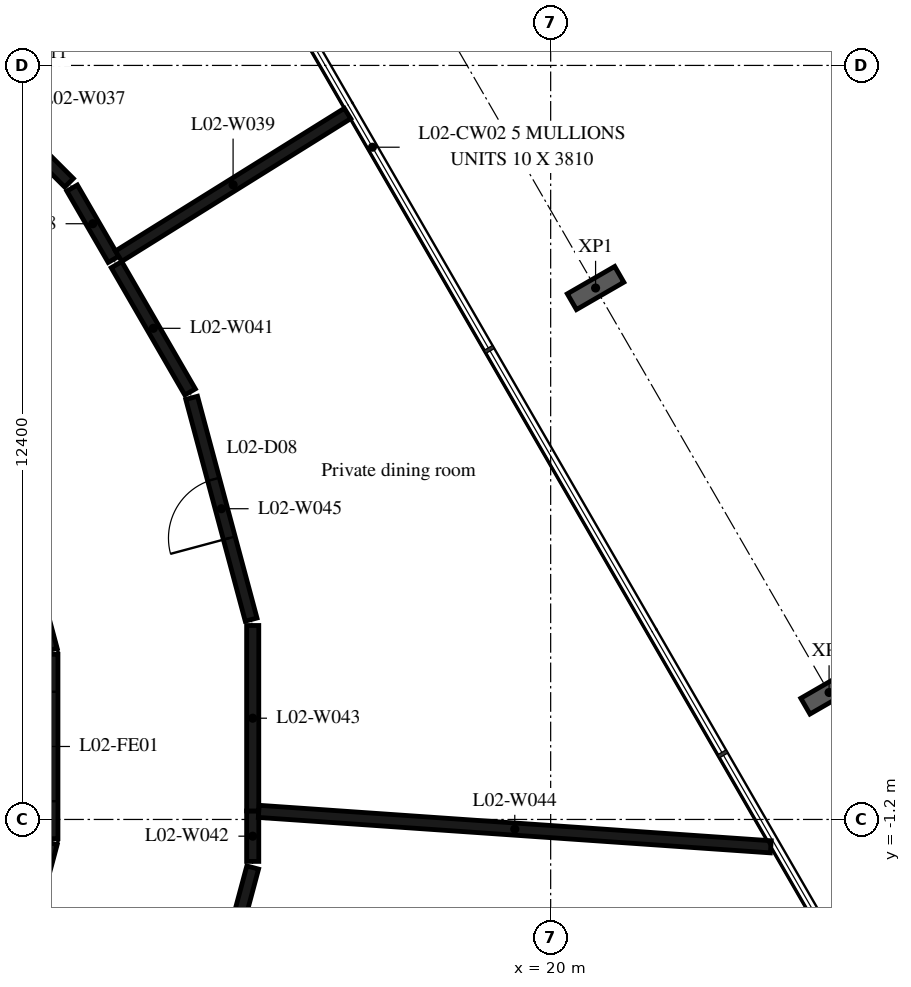
"""IFC4 building model, lengths in metres.
Left out: names, types, materials, properties, quantities, classifications, styles, units other than length and angle.
Written with IfcOpenShell. Run it as: python <this file> out.ifc"""

import sys

from ifc_helpers import new_model, si_unit, direction, frame, frame_2d, origin, origin_2d, place, context, subcontext, project, spatial, rectangle, i_section, extrude, element, fill, save


model = new_model("IFC4")
c1 = context("Model", 3, precision=1e-05, world=origin(), true_north=direction((0.0, 1.0)))
c2 = subcontext(c1, "Body", "Model", "MODEL_VIEW")
j1 = project(units=[si_unit("LENGTHUNIT", "METRE"), si_unit("PLANEANGLEUNIT", "RADIAN")], contexts=[c1])
p1 = place(None, origin())
s1 = spatial("IfcSite", under=j1, at=p1, CompositionType="ELEMENT")
p2 = place(p1, origin())
s2 = spatial("IfcBuilding", under=s1, at=p2, CompositionType="ELEMENT")
p3 = place(p2, frame((0.0, 0.0, 13.8)))
s3 = spatial("IfcBuildingStorey", under=s2, at=p3, CompositionType="ELEMENT", Elevation=13.8)
for number, where, z_axis, x_axis in (
    (1, (24.579, 0.888, -0.38), (0.0, 0.0, 1.0), (0.5, -0.866, 0.0)),
    (2, (20.739, 7.539, -0.38), (0.0, 0.0, 1.0), (0.5, -0.866, 0.0)),
):
    element("IfcColumn", number, at=place(p3, frame(where, z_axis=z_axis, x_axis=x_axis)), inside=s3, PredefinedType="COLUMN", context=c2, shape_type="SweptSolid", body=[
        extrude(i_section(OverallWidth=0.3, OverallDepth=0.9, WebThickness=0.019, FlangeThickness=0.035, FilletRadius=0.03, at=origin_2d()), origin(), (0.0, 0.0, 1.0), 4.8),
    ])
p4 = place(p3, frame((10.858, -4.479, 0.0), z_axis=(0.0, 0.0, 1.0), x_axis=(0.258734743916, 0.965948410781, 0.0)))
e3 = element("IfcWall", 3, at=p4, inside=s3, PredefinedType="SHEAR", context=c2, shape_type="SweptSolid", body=[
    extrude(rectangle(XDim=3.033, YDim=0.5, at=frame_2d((1.516, 0.0))), origin(), (0.0, 0.0, 1.0), 4.42),
])
p5 = place(p3, frame((11.647, -1.516, 0.0), z_axis=(0.0, 0.0, 1.0), x_axis=(0.0, 1.0, 0.0)))
e4 = element("IfcWall", 4, at=p5, inside=s3, PredefinedType="SHEAR", context=c2, shape_type="SweptSolid", body=[
    extrude(rectangle(XDim=3.033, YDim=0.5, at=frame_2d((1.516, 0.0))), origin(), (0.0, 0.0, 1.0), 4.42),
])
p6 = place(p5, frame((0.616, 0.0, 0.0)))
e5 = element("IfcOpeningElement", 5, at=p6, cuts=e4, PredefinedType="OPENING", context=c2, shape_type="SweptSolid", body=[
    extrude(rectangle(XDim=1.8, YDim=2.1, at=frame_2d((0.9, 1.05))), frame((0.0, 0.26, 0.0), z_axis=(0.0, -1.0, 0.0), x_axis=(1.0, 0.0, 0.0)), (0.0, 0.0, 1.0), 0.52),
])
p7 = place(p3, frame((11.643, 1.55, 0.0), z_axis=(0.0, 0.0, 1.0), x_axis=(-0.258734743916, 0.965948410781, 0.0)))
e6 = element("IfcWall", 6, at=p7, inside=s3, PredefinedType="SHEAR", context=c2, shape_type="SweptSolid", body=[
    extrude(rectangle(XDim=3.033, YDim=0.5, at=frame_2d((1.516, 0.0))), origin(), (0.0, 0.0, 1.0), 4.42),
])
p8 = place(p3, frame((12.08, 9.27, 0.0), z_axis=(0.0, 0.0, 1.0), x_axis=(-0.707106781187, 0.707106781187, 0.0)))
e7 = element("IfcWall", 7, at=p8, inside=s3, PredefinedType="PARTITIONING", context=c2, shape_type="SweptSolid", body=[
    extrude(rectangle(XDim=3.874, YDim=0.2, at=frame_2d((1.937, 0.0))), origin(), (0.0, 0.0, 1.0), 4.42),
])
p9 = place(p8, frame((1.437, 0.0, 0.0)))
e8 = element("IfcOpeningElement", 8, at=p9, cuts=e7, PredefinedType="OPENING", context=c2, shape_type="SweptSolid", body=[
    extrude(rectangle(XDim=1.0, YDim=2.1, at=frame_2d((0.5, 1.05))), frame((0.0, 0.11, 0.0), z_axis=(0.0, -1.0, 0.0), x_axis=(1.0, 0.0, 0.0)), (0.0, 0.0, 1.0), 0.22),
])
p10 = place(p3, frame((12.81, 8.01, 0.0), z_axis=(0.0, 0.0, 1.0), x_axis=(-0.501305875941, 0.865270142064, 0.0)))
e9 = element("IfcWall", 9, at=p10, inside=s3, PredefinedType="PARTITIONING", context=c2, shape_type="SweptSolid", body=[
    extrude(rectangle(XDim=1.356, YDim=0.2, at=frame_2d((0.678, 0.0))), origin(), (0.0, 0.0, 1.0), 4.42),
])
p11 = place(p3, frame((12.895, 8.063, 0.0), z_axis=(0.0, 0.0, 1.0), x_axis=(0.848634527268, 0.528979620712, 0.0)))
e10 = element("IfcWall", 10, at=p11, inside=s3, PredefinedType="PARTITIONING", context=c2, shape_type="SweptSolid", body=[
    extrude(rectangle(XDim=4.437, YDim=0.2, at=frame_2d((2.218, 0.0))), origin(), (0.0, 0.0, 1.0), 4.42),
])
p12 = place(p3, frame((14.096, -5.733, 0.0), z_axis=(0.0, 0.0, 1.0), x_axis=(0.259085569159, 0.96585437197, 0.0)))
e11 = element("IfcWall", 11, at=p12, inside=s3, PredefinedType="PARTITIONING", context=c2, shape_type="SweptSolid", body=[
    extrude(rectangle(XDim=3.876, YDim=0.2, at=frame_2d((1.938, 0.0))), origin(), (0.0, 0.0, 1.0), 4.42),
])
p13 = place(p12, frame((1.338, 0.0, 0.0)))
e12 = element("IfcOpeningElement", 12, at=p13, cuts=e11, PredefinedType="OPENING", context=c2, shape_type="SweptSolid", body=[
    extrude(rectangle(XDim=1.2, YDim=2.1, at=frame_2d((0.6, 1.05))), frame((0.0, 0.11, 0.0), z_axis=(0.0, -1.0, 0.0), x_axis=(1.0, 0.0, 0.0)), (0.0, 0.0, 1.0), 0.22),
])
p14 = place(p3, frame((14.07, 5.83, 0.0), z_axis=(0.0, 0.0, 1.0), x_axis=(-0.500439091614, 0.865771745661, 0.0)))
e13 = element("IfcWall", 13, at=p14, inside=s3, PredefinedType="PARTITIONING", context=c2, shape_type="SweptSolid", body=[
    extrude(rectangle(XDim=2.418, YDim=0.2, at=frame_2d((1.209, 0.0))), origin(), (0.0, 0.0, 1.0), 4.42),
])
p15 = place(p3, frame((15.1, -1.89, 0.0), z_axis=(0.0, 0.0, 1.0), x_axis=(0.0, 1.0, 0.0)))
e14 = element("IfcWall", 14, at=p15, inside=s3, PredefinedType="PARTITIONING", context=c2, shape_type="SweptSolid", body=[
    extrude(rectangle(XDim=0.83, YDim=0.2, at=frame_2d((0.415, 0.0))), origin(), (0.0, 0.0, 1.0), 4.42),
])
p16 = place(p3, frame((15.1, -1.06, 0.0), z_axis=(0.0, 0.0, 1.0), x_axis=(0.0, 1.0, 0.0)))
e15 = element("IfcWall", 15, at=p16, inside=s3, PredefinedType="PARTITIONING", context=c2, shape_type="SweptSolid", body=[
    extrude(rectangle(XDim=3.05, YDim=0.2, at=frame_2d((1.525, 0.0))), origin(), (0.0, 0.0, 1.0), 4.42),
])
p17 = place(p3, frame((15.2, -1.067, 0.0), z_axis=(0.0, 0.0, 1.0), x_axis=(0.997611670562, -0.069072098269, 0.0)))
e16 = element("IfcWall", 16, at=p17, inside=s3, PredefinedType="PARTITIONING", context=c2, shape_type="SweptSolid", body=[
    extrude(rectangle(XDim=8.441, YDim=0.2, at=frame_2d((4.22, 0.0))), origin(), (0.0, 0.0, 1.0), 4.42),
])
p18 = place(p3, frame((15.074, 2.087, 0.0), z_axis=(0.0, 0.0, 1.0), x_axis=(-0.259038819442, 0.965866911133, 0.0)))
e17 = element("IfcWall", 17, at=p18, inside=s3, PredefinedType="PARTITIONING", context=c2, shape_type="SweptSolid", body=[
    extrude(rectangle(XDim=3.776, YDim=0.2, at=frame_2d((1.888, 0.0))), origin(), (0.0, 0.0, 1.0), 4.42),
])
p19 = place(p18, frame((1.388, 0.0, 0.0)))
e18 = element("IfcOpeningElement", 18, at=p19, cuts=e17, PredefinedType="OPENING", context=c2, shape_type="SweptSolid", body=[
    extrude(rectangle(XDim=1.0, YDim=2.1, at=frame_2d((0.5, 1.05))), frame((0.0, 0.11, 0.0), z_axis=(0.0, -1.0, 0.0), x_axis=(1.0, 0.0, 0.0)), (0.0, 0.0, 1.0), 0.22),
])
p20 = place(p19, origin())
e19 = element("IfcDoor", 19, at=p20, inside=s3, OperationType="SINGLE_SWING_LEFT", PredefinedType="DOOR", context=c2, shape_type="SweptSolid", body=[
    extrude(rectangle(XDim=1.0, YDim=2.1, at=frame_2d((0.5, 1.05))), frame((0.0, 0.025, 0.0), z_axis=(0.0, -1.0, 0.0), x_axis=(1.0, 0.0, 0.0)), (0.0, 0.0, 1.0), 0.05),
])
fill(e18, e19)
save(model, sys.argv[1])
